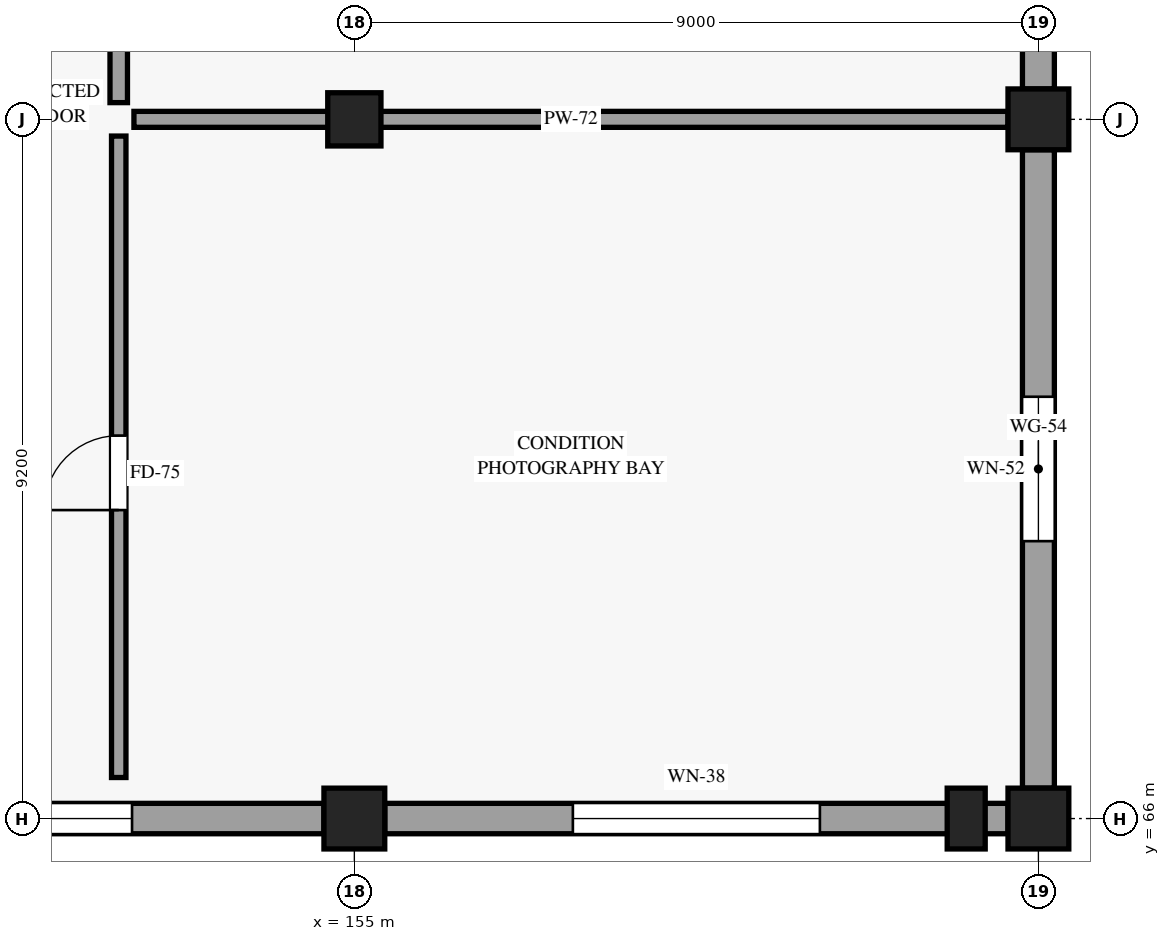
"""IFC4 building model, lengths in metres.
Left out: names, types, materials, properties, quantities, classifications, styles, units other than length and angle.
Written with IfcOpenShell. Run it as: python <this file> out.ifc"""

import sys

from ifc_helpers import new_model, si_unit, direction, frame, frame_2d, origin, origin_2d, place, context, subcontext, project, spatial, rectangle, extrude, element, fill, save


model = new_model("IFC4")
c1 = context("Model", 3, precision=1e-05, world=origin(), true_north=direction((0.0, 1.0)))
c2 = subcontext(c1, "Body", "Model", "MODEL_VIEW")
j1 = project(units=[si_unit("LENGTHUNIT", "METRE"), si_unit("PLANEANGLEUNIT", "RADIAN")], contexts=[c1])
p1 = place(None, origin())
s1 = spatial("IfcSite", under=j1, at=p1, CompositionType="ELEMENT")
p2 = place(p1, origin())
s2 = spatial("IfcBuilding", under=s1, at=p2, CompositionType="ELEMENT")
p3 = place(p2, origin())
s3 = spatial("IfcBuildingStorey", under=s2, at=p3, CompositionType="ELEMENT", Elevation=0.0)
p4 = place(p3, frame((155.0, 66.0, 0.0), z_axis=(0.0, 0.0, 1.0), x_axis=(1.0, 0.0, 0.0)))
e1 = element("IfcColumn", 1, at=p4, inside=s3, PredefinedType="COLUMN", context=c2, shape_type="SweptSolid", body=[
    extrude(rectangle(XDim=0.8, YDim=0.8, at=origin_2d()), origin(), (0.0, 0.0, 1.0), 5.4),
])
p5 = place(p3, frame((155.0, 75.2, 0.0), z_axis=(0.0, 0.0, 1.0), x_axis=(1.0, 0.0, 0.0)))
e2 = element("IfcColumn", 2, at=p5, inside=s3, PredefinedType="COLUMN", context=c2, shape_type="SweptSolid", body=[
    extrude(rectangle(XDim=0.7, YDim=0.7, at=origin_2d()), origin(), (0.0, 0.0, 1.0), 5.4),
])
for number, where, z_axis, x_axis in (
    (3, (164.0, 66.0, 0.0), (0.0, 0.0, 1.0), (1.0, 0.0, 0.0)),
    (4, (164.0, 75.2, 0.0), (0.0, 0.0, 1.0), (1.0, 0.0, 0.0)),
):
    element("IfcColumn", number, at=place(p3, frame(where, z_axis=z_axis, x_axis=x_axis)), inside=s3, PredefinedType="COLUMN", context=c2, shape_type="SweptSolid", body=[
        extrude(rectangle(XDim=0.8, YDim=0.8, at=origin_2d()), origin(), (0.0, 0.0, 1.0), 5.4),
    ])
p6 = place(p3, frame((163.05, 66.0, 0.0), z_axis=(0.0, 0.0, 1.0), x_axis=(1.0, 0.0, 0.0)))
e5 = element("IfcColumn", 5, at=p6, inside=s3, PredefinedType="PILASTER", context=c2, shape_type="SweptSolid", body=[
    extrude(rectangle(XDim=0.5, YDim=0.8, at=origin_2d()), origin(), (0.0, 0.0, 1.0), 4.35),
])
p7 = place(p3, frame((146.4, 66.0, 0.0), z_axis=(0.0, 0.0, 1.0), x_axis=(1.0, 0.0, 0.0)))
e6 = element("IfcWall", 6, at=p7, inside=s3, PredefinedType="STANDARD", context=c2, shape_type="SweptSolid", body=[
    extrude(rectangle(XDim=8.2, YDim=0.4, at=frame_2d((4.1, 0.0))), origin(), (0.0, 0.0, 1.0), 4.095),
])
p8 = place(p7, frame((5.675, 0.0, 0.85), z_axis=(0.0, 0.0, 1.0), x_axis=(-1.0, 0.0, 0.0)))
e7 = element("IfcOpeningElement", 7, at=p8, cuts=e6, PredefinedType="OPENING", context=c2, shape_type="SweptSolid", body=[
    extrude(rectangle(XDim=3.15, YDim=2.55, at=frame_2d((1.575, 1.275))), frame((0.0, 0.21, 0.0), z_axis=(0.0, -1.0, 0.0), x_axis=(1.0, 0.0, 0.0)), (0.0, 0.0, 1.0), 0.42),
])
p9 = place(p3, frame((155.4, 66.0, 0.0), z_axis=(0.0, 0.0, 1.0), x_axis=(1.0, 0.0, 0.0)))
e8 = element("IfcWall", 8, at=p9, inside=s3, PredefinedType="STANDARD", context=c2, shape_type="SweptSolid", body=[
    extrude(rectangle(XDim=8.2, YDim=0.4, at=frame_2d((4.1, 0.0))), origin(), (0.0, 0.0, 1.0), 4.095),
])
p10 = place(p9, frame((5.725, 0.0, 0.85), z_axis=(0.0, 0.0, 1.0), x_axis=(-1.0, 0.0, 0.0)))
e9 = element("IfcOpeningElement", 9, at=p10, cuts=e8, PredefinedType="OPENING", context=c2, shape_type="SweptSolid", body=[
    extrude(rectangle(XDim=3.25, YDim=2.6, at=frame_2d((1.625, 1.3))), frame((0.0, 0.21, 0.0), z_axis=(0.0, -1.0, 0.0), x_axis=(1.0, 0.0, 0.0)), (0.0, 0.0, 1.0), 0.42),
])
p11 = place(p3, frame((164.0, 66.4, 0.0), z_axis=(0.0, 0.0, 1.0), x_axis=(0.0, 1.0, 0.0)))
e10 = element("IfcWall", 10, at=p11, inside=s3, PredefinedType="STANDARD", context=c2, shape_type="SweptSolid", body=[
    extrude(rectangle(XDim=8.4, YDim=0.42, at=frame_2d((4.2, 0.0))), origin(), (0.0, 0.0, 1.0), 4.095),
])
p12 = place(p11, frame((5.15, 0.0, 0.85), z_axis=(0.0, 0.0, 1.0), x_axis=(-1.0, 0.0, 0.0)))
e11 = element("IfcOpeningElement", 11, at=p12, cuts=e10, PredefinedType="OPENING", context=c2, shape_type="SweptSolid", body=[
    extrude(rectangle(XDim=1.9, YDim=2.4, at=frame_2d((0.95, 1.2))), frame((0.0, 0.22, 0.0), z_axis=(0.0, -1.0, 0.0), x_axis=(1.0, 0.0, 0.0)), (0.0, 0.0, 1.0), 0.44),
])
p13 = place(p3, frame((164.0, 75.6, 0.0), z_axis=(0.0, 0.0, 1.0), x_axis=(0.0, 1.0, 0.0)))
e12 = element("IfcWall", 12, at=p13, inside=s3, PredefinedType="STANDARD", context=c2, shape_type="SweptSolid", body=[
    extrude(rectangle(XDim=8.4, YDim=0.42, at=frame_2d((4.2, 0.0))), origin(), (0.0, 0.0, 1.0), 4.095),
])
p14 = place(p13, frame((5.25, 0.0, 0.85), z_axis=(0.0, 0.0, 1.0), x_axis=(-1.0, 0.0, 0.0)))
e13 = element("IfcOpeningElement", 13, at=p14, cuts=e12, PredefinedType="OPENING", context=c2, shape_type="SweptSolid", body=[
    extrude(rectangle(XDim=2.1, YDim=2.45, at=frame_2d((1.05, 1.225))), frame((0.0, 0.22, 0.0), z_axis=(0.0, -1.0, 0.0), x_axis=(1.0, 0.0, 0.0)), (0.0, 0.0, 1.0), 0.44),
])
p15 = place(p3, frame((151.9, 66.54, 0.0), z_axis=(0.0, 0.0, 1.0), x_axis=(0.0, 1.0, 0.0)))
e14 = element("IfcWall", 14, at=p15, inside=s3, PredefinedType="PARTITIONING", context=c2, shape_type="SweptSolid", body=[
    extrude(rectangle(XDim=8.44, YDim=0.19, at=frame_2d((4.22, 0.0))), origin(), (0.0, 0.0, 1.0), 4.095),
])
p16 = place(p15, frame((3.519, 0.0, 0.0)))
e15 = element("IfcOpeningElement", 15, at=p16, cuts=e14, PredefinedType="OPENING", context=c2, shape_type="SweptSolid", body=[
    extrude(rectangle(XDim=0.98, YDim=2.18, at=frame_2d((0.49, 1.09))), frame((0.0, 0.105, 0.0), z_axis=(0.0, -1.0, 0.0), x_axis=(1.0, 0.0, 0.0)), (0.0, 0.0, 1.0), 0.21),
])
p17 = place(p3, frame((152.1, 75.2, 0.0), z_axis=(0.0, 0.0, 1.0), x_axis=(1.0, 0.0, 0.0)))
e16 = element("IfcWall", 16, at=p17, inside=s3, PredefinedType="PARTITIONING", context=c2, shape_type="SweptSolid", body=[
    extrude(rectangle(XDim=11.5, YDim=0.21, at=frame_2d((5.75, 0.0))), origin(), (0.0, 0.0, 1.0), 4.095),
])
p18 = place(p3, frame((151.9, 75.42, 0.0), z_axis=(0.0, 0.0, 1.0), x_axis=(0.0, 1.0, 0.0)))
e17 = element("IfcWall", 17, at=p18, inside=s3, PredefinedType="PARTITIONING", context=c2, shape_type="SweptSolid", body=[
    extrude(rectangle(XDim=8.76, YDim=0.23, at=frame_2d((4.38, 0.0))), origin(), (0.0, 0.0, 1.0), 4.095),
])
p19 = place(p18, frame((3.88, 0.0, 0.0)))
e18 = element("IfcOpeningElement", 18, at=p19, cuts=e17, PredefinedType="OPENING", context=c2, shape_type="SweptSolid", body=[
    extrude(rectangle(XDim=1.04, YDim=2.22, at=frame_2d((0.52, 1.11))), frame((0.0, 0.125, 0.0), z_axis=(0.0, -1.0, 0.0), x_axis=(1.0, 0.0, 0.0)), (0.0, 0.0, 1.0), 0.25),
])
p20 = place(p8, origin())
e19 = element("IfcWindow", 19, at=p20, inside=s3, PartitioningType="SINGLE_PANEL", PredefinedType="WINDOW", context=c2, shape_type="SweptSolid", body=[
    extrude(rectangle(XDim=3.15, YDim=2.55, at=frame_2d((1.575, 1.275))), frame((0.0, 0.03, 0.0), z_axis=(0.0, -1.0, 0.0), x_axis=(1.0, 0.0, 0.0)), (0.0, 0.0, 1.0), 0.06),
])
fill(e7, e19)
p21 = place(p10, origin())
e20 = element("IfcWindow", 20, at=p21, inside=s3, PartitioningType="SINGLE_PANEL", PredefinedType="WINDOW", context=c2, shape_type="SweptSolid", body=[
    extrude(rectangle(XDim=3.25, YDim=2.6, at=frame_2d((1.625, 1.3))), frame((0.0, 0.03, 0.0), z_axis=(0.0, -1.0, 0.0), x_axis=(1.0, 0.0, 0.0)), (0.0, 0.0, 1.0), 0.06),
])
fill(e9, e20)
p22 = place(p12, origin())
e21 = element("IfcWindow", 21, at=p22, inside=s3, PartitioningType="SINGLE_PANEL", PredefinedType="WINDOW", context=c2, shape_type="SweptSolid", body=[
    extrude(rectangle(XDim=1.9, YDim=2.4, at=frame_2d((0.95, 1.2))), frame((0.0, 0.03, 0.0), z_axis=(0.0, -1.0, 0.0), x_axis=(1.0, 0.0, 0.0)), (0.0, 0.0, 1.0), 0.06),
])
fill(e11, e21)
p23 = place(p16, origin())
e22 = element("IfcDoor", 22, at=p23, inside=s3, OperationType="SINGLE_SWING_LEFT", PredefinedType="DOOR", context=c2, shape_type="SweptSolid", body=[
    extrude(rectangle(XDim=0.98, YDim=2.18, at=frame_2d((0.49, 1.09))), frame((0.0, 0.025, 0.0), z_axis=(0.0, -1.0, 0.0), x_axis=(1.0, 0.0, 0.0)), (0.0, 0.0, 1.0), 0.05),
])
fill(e15, e22)
save(model, sys.argv[1])
